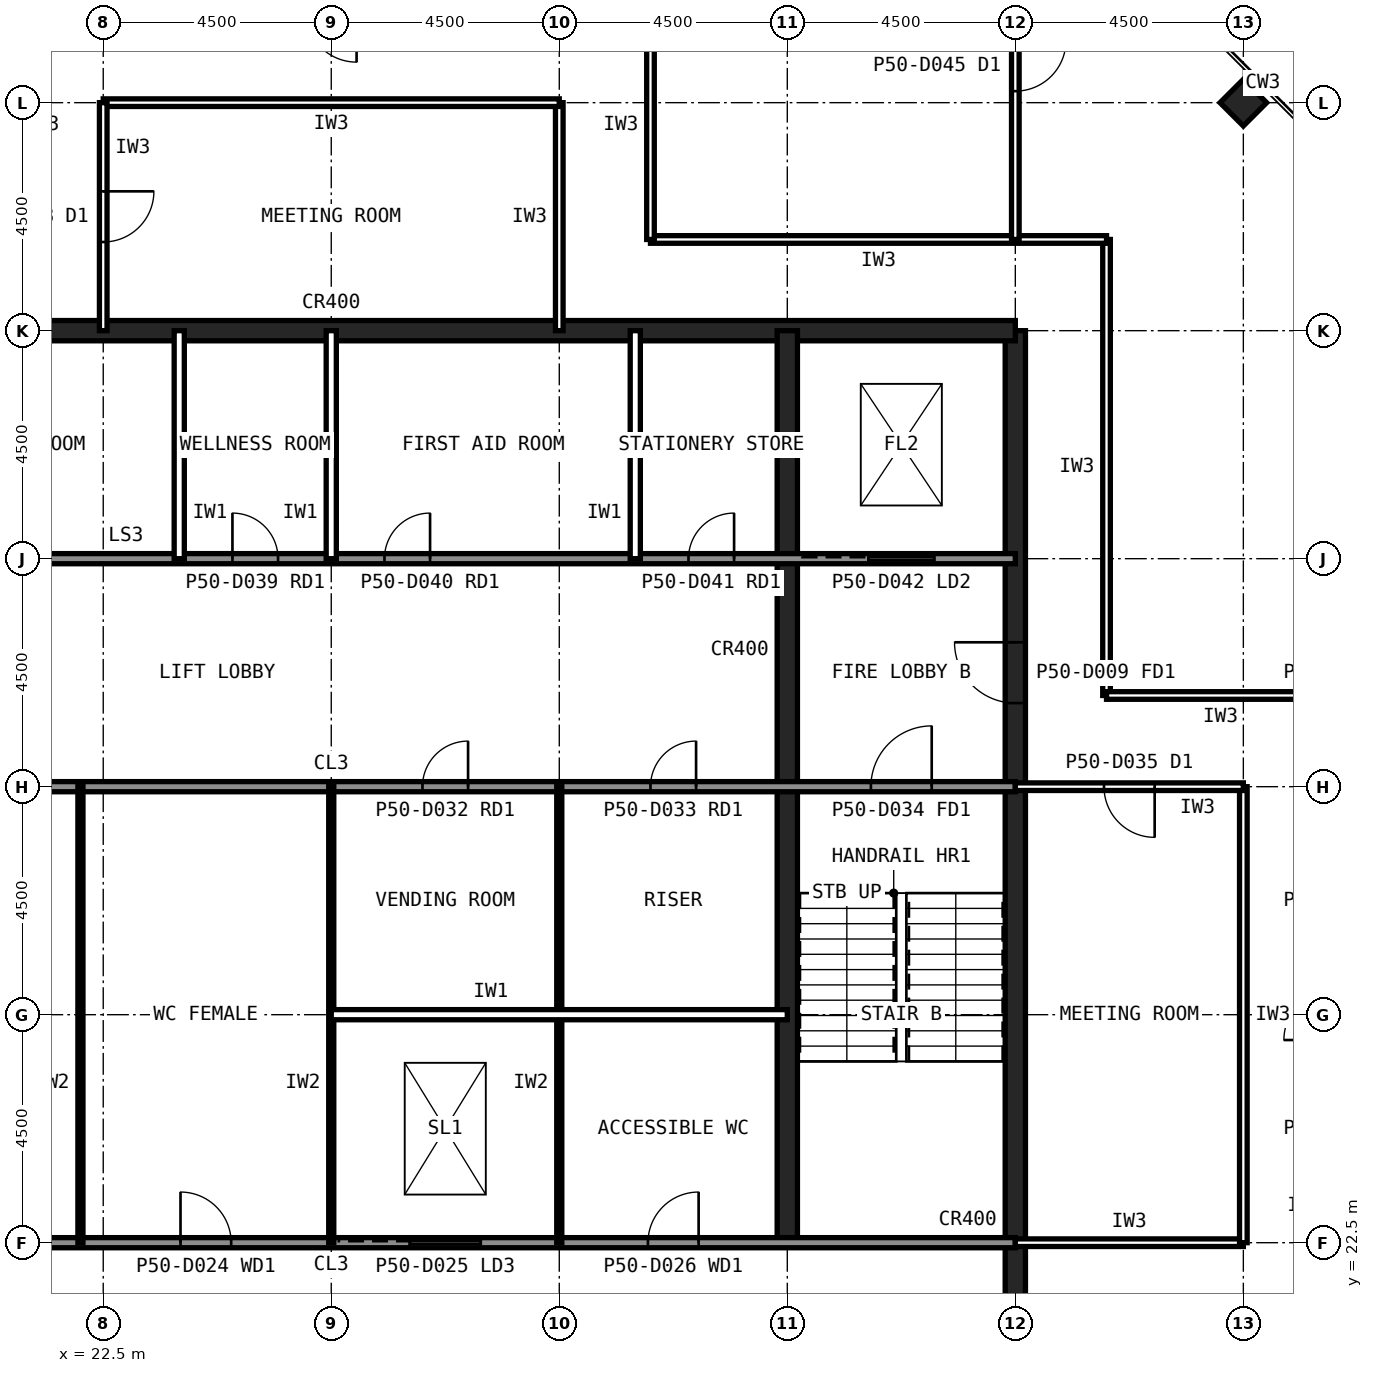
"""IFC4 building model, lengths in metres.
Left out: names, types, materials, properties, quantities, classifications, styles, units other than length and angle.
Written with IfcOpenShell. Run it as: python <this file> out.ifc"""

import sys

from ifc_helpers import new_model, si_unit, direction, frame, frame_2d, origin, origin_2d, place, context, subcontext, project, spatial, rectangle, hollow_rectangle, extrude, element, fill, save


model = new_model("IFC4")
c1 = context("Model", 3, precision=1e-05, world=origin(), true_north=direction((0.0, 1.0)))
c2 = subcontext(c1, "Body", "Model", "MODEL_VIEW")
j1 = project(units=[si_unit("LENGTHUNIT", "METRE"), si_unit("PLANEANGLEUNIT", "RADIAN")], contexts=[c1])
p1 = place(None, origin())
s1 = spatial("IfcSite", under=j1, at=p1, CompositionType="ELEMENT")
p2 = place(p1, origin())
s2 = spatial("IfcBuilding", under=s1, at=p2, CompositionType="ELEMENT")
p3 = place(p2, frame((0.0, 0.0, 214.6)))
s3 = spatial("IfcBuildingStorey", under=s2, at=p3, CompositionType="ELEMENT", Elevation=214.6)
p4 = place(p3, frame((45.0, 45.0, 0.0), z_axis=(0.0, 0.0, 1.0), x_axis=(0.707106781187, 0.707106781187, 0.0)))
e1 = element("IfcColumn", 1, at=p4, inside=s3, PredefinedType="COLUMN", context=c2, shape_type="SweptSolid", body=[
    extrude(hollow_rectangle(XDim=0.65, YDim=0.65, WallThickness=0.032, at=origin_2d()), origin(), (0.0, 0.0, 1.0), 4.0),
])
p5 = place(p3, frame((40.5, 13.5, 0.0), z_axis=(0.0, 0.0, 1.0), x_axis=(0.0, 1.0, 0.0)))
e2 = element("IfcWall", 2, at=p5, inside=s3, PredefinedType="SHEAR", context=c2, shape_type="SweptSolid", body=[
    extrude(rectangle(XDim=27.0, YDim=0.4, at=frame_2d((13.5, 0.0))), origin(), (0.0, 0.0, 1.0), 4.0),
])
p6 = place(p5, frame((5.85, 0.0, 0.0)))
e3 = element("IfcOpeningElement", 3, at=p6, cuts=e2, PredefinedType="OPENING", context=c2, shape_type="SweptSolid", body=[
    extrude(rectangle(XDim=1.8, YDim=2.1, at=frame_2d((0.9, 1.05))), frame((0.0, 0.21, 0.0), z_axis=(0.0, -1.0, 0.0), x_axis=(1.0, 0.0, 0.0)), (0.0, 0.0, 1.0), 0.42),
])
p7 = place(p5, frame((19.65, 0.0, 0.0)))
e4 = element("IfcOpeningElement", 4, at=p7, cuts=e2, PredefinedType="OPENING", context=c2, shape_type="SweptSolid", body=[
    extrude(rectangle(XDim=1.2, YDim=2.1, at=frame_2d((0.6, 1.05))), frame((0.0, 0.21, 0.0), z_axis=(0.0, -1.0, 0.0), x_axis=(1.0, 0.0, 0.0)), (0.0, 0.0, 1.0), 0.42),
])
p8 = place(p3, frame((40.5, 40.5, 0.0), z_axis=(0.0, 0.0, 1.0), x_axis=(-1.0, 0.0, 0.0)))
e5 = element("IfcWall", 5, at=p8, inside=s3, PredefinedType="SHEAR", context=c2, shape_type="SweptSolid", body=[
    extrude(rectangle(XDim=27.0, YDim=0.4, at=frame_2d((13.5, 0.0))), origin(), (0.0, 0.0, 1.0), 4.0),
])
p9 = place(p3, frame((36.0, 22.5, 0.0), z_axis=(0.0, 0.0, 1.0), x_axis=(0.0, 1.0, 0.0)))
e6 = element("IfcWall", 6, at=p9, inside=s3, PredefinedType="SHEAR", context=c2, shape_type="SweptSolid", body=[
    extrude(rectangle(XDim=18.0, YDim=0.4, at=frame_2d((9.0, 0.0))), origin(), (0.0, 0.0, 1.0), 4.0),
])
p10 = place(p3, frame((13.5, 36.0, 0.0), z_axis=(0.0, 0.0, 1.0), x_axis=(1.0, 0.0, 0.0)))
e7 = element("IfcWall", 7, at=p10, inside=s3, PredefinedType="SOLIDWALL", context=c2, shape_type="SweptSolid", body=[
    extrude(rectangle(XDim=27.0, YDim=0.2, at=frame_2d((13.5, 0.0))), origin(), (0.0, 0.0, 1.0), 3.84),
])
p11 = place(p10, frame((1.8, 0.0, 0.0)))
e8 = element("IfcOpeningElement", 8, at=p11, cuts=e7, PredefinedType="OPENING", context=c2, shape_type="SweptSolid", body=[
    extrude(rectangle(XDim=0.9, YDim=2.1, at=frame_2d((0.45, 1.05))), frame((0.0, 0.11, 0.0), z_axis=(0.0, -1.0, 0.0), x_axis=(1.0, 0.0, 0.0)), (0.0, 0.0, 1.0), 0.22),
])
p12 = place(p10, frame((5.55, 0.0, 0.0)))
e9 = element("IfcOpeningElement", 9, at=p12, cuts=e7, PredefinedType="OPENING", context=c2, shape_type="SweptSolid", body=[
    extrude(rectangle(XDim=0.9, YDim=2.1, at=frame_2d((0.45, 1.05))), frame((0.0, 0.11, 0.0), z_axis=(0.0, -1.0, 0.0), x_axis=(1.0, 0.0, 0.0)), (0.0, 0.0, 1.0), 0.22),
])
p13 = place(p10, frame((11.55, 0.0, 0.0)))
e10 = element("IfcOpeningElement", 10, at=p13, cuts=e7, PredefinedType="OPENING", context=c2, shape_type="SweptSolid", body=[
    extrude(rectangle(XDim=0.9, YDim=2.1, at=frame_2d((0.45, 1.05))), frame((0.0, 0.11, 0.0), z_axis=(0.0, -1.0, 0.0), x_axis=(1.0, 0.0, 0.0)), (0.0, 0.0, 1.0), 0.22),
])
p14 = place(p10, frame((14.55, 0.0, 0.0)))
e11 = element("IfcOpeningElement", 11, at=p14, cuts=e7, PredefinedType="OPENING", context=c2, shape_type="SweptSolid", body=[
    extrude(rectangle(XDim=0.9, YDim=2.1, at=frame_2d((0.45, 1.05))), frame((0.0, 0.11, 0.0), z_axis=(0.0, -1.0, 0.0), x_axis=(1.0, 0.0, 0.0)), (0.0, 0.0, 1.0), 0.22),
])
p15 = place(p10, frame((20.55, 0.0, 0.0)))
e12 = element("IfcOpeningElement", 12, at=p15, cuts=e7, PredefinedType="OPENING", context=c2, shape_type="SweptSolid", body=[
    extrude(rectangle(XDim=0.9, YDim=2.1, at=frame_2d((0.45, 1.05))), frame((0.0, 0.11, 0.0), z_axis=(0.0, -1.0, 0.0), x_axis=(1.0, 0.0, 0.0)), (0.0, 0.0, 1.0), 0.22),
])
p16 = place(p10, frame((24.1, 0.0, 0.0)))
e13 = element("IfcOpeningElement", 13, at=p16, cuts=e7, PredefinedType="OPENING", context=c2, shape_type="SweptSolid", body=[
    extrude(rectangle(XDim=1.3, YDim=2.2, at=frame_2d((0.65, 1.1))), frame((0.0, 0.11, 0.0), z_axis=(0.0, -1.0, 0.0), x_axis=(1.0, 0.0, 0.0)), (0.0, 0.0, 1.0), 0.22),
])
p17 = place(p3, frame((13.5, 22.5, 0.0), z_axis=(0.0, 0.0, 1.0), x_axis=(1.0, 0.0, 0.0)))
e14 = element("IfcWall", 14, at=p17, inside=s3, PredefinedType="SOLIDWALL", context=c2, shape_type="SweptSolid", body=[
    extrude(rectangle(XDim=27.0, YDim=0.2, at=frame_2d((13.5, 0.0))), origin(), (0.0, 0.0, 1.0), 3.84),
])
p18 = place(p17, frame((1.65, 0.0, 0.0)))
e15 = element("IfcOpeningElement", 15, at=p18, cuts=e14, PredefinedType="OPENING", context=c2, shape_type="SweptSolid", body=[
    extrude(rectangle(XDim=1.2, YDim=2.1, at=frame_2d((0.6, 1.05))), frame((0.0, 0.11, 0.0), z_axis=(0.0, -1.0, 0.0), x_axis=(1.0, 0.0, 0.0)), (0.0, 0.0, 1.0), 0.22),
])
p19 = place(p17, frame((6.025, 0.0, 0.0)))
e16 = element("IfcOpeningElement", 16, at=p19, cuts=e14, PredefinedType="OPENING", context=c2, shape_type="SweptSolid", body=[
    extrude(rectangle(XDim=1.0, YDim=2.1, at=frame_2d((0.5, 1.05))), frame((0.0, 0.11, 0.0), z_axis=(0.0, -1.0, 0.0), x_axis=(1.0, 0.0, 0.0)), (0.0, 0.0, 1.0), 0.22),
])
p20 = place(p17, frame((10.525, 0.0, 0.0)))
e17 = element("IfcOpeningElement", 17, at=p20, cuts=e14, PredefinedType="OPENING", context=c2, shape_type="SweptSolid", body=[
    extrude(rectangle(XDim=1.0, YDim=2.1, at=frame_2d((0.5, 1.05))), frame((0.0, 0.11, 0.0), z_axis=(0.0, -1.0, 0.0), x_axis=(1.0, 0.0, 0.0)), (0.0, 0.0, 1.0), 0.22),
])
p21 = place(p17, frame((19.75, 0.0, 0.0)))
e18 = element("IfcOpeningElement", 18, at=p21, cuts=e14, PredefinedType="OPENING", context=c2, shape_type="SweptSolid", body=[
    extrude(rectangle(XDim=1.0, YDim=2.1, at=frame_2d((0.5, 1.05))), frame((0.0, 0.11, 0.0), z_axis=(0.0, -1.0, 0.0), x_axis=(1.0, 0.0, 0.0)), (0.0, 0.0, 1.0), 0.22),
])
p22 = place(p17, frame((15.05, 0.0, 0.0)))
e19 = element("IfcOpeningElement", 19, at=p22, cuts=e14, PredefinedType="OPENING", context=c2, shape_type="SweptSolid", body=[
    extrude(rectangle(XDim=1.4, YDim=2.4, at=frame_2d((0.7, 1.2))), frame((0.0, 0.11, 0.0), z_axis=(0.0, -1.0, 0.0), x_axis=(1.0, 0.0, 0.0)), (0.0, 0.0, 1.0), 0.22),
])
p23 = place(p3, frame((13.5, 31.5, 0.0), z_axis=(0.0, 0.0, 1.0), x_axis=(1.0, 0.0, 0.0)))
e20 = element("IfcWall", 20, at=p23, inside=s3, PredefinedType="SOLIDWALL", context=c2, shape_type="SweptSolid", body=[
    extrude(rectangle(XDim=27.0, YDim=0.2, at=frame_2d((13.5, 0.0))), origin(), (0.0, 0.0, 1.0), 3.84),
])
p24 = place(p23, frame((24.15, 0.0, 0.0)))
e21 = element("IfcOpeningElement", 21, at=p24, cuts=e20, PredefinedType="OPENING", context=c2, shape_type="SweptSolid", body=[
    extrude(rectangle(XDim=1.2, YDim=2.1, at=frame_2d((0.6, 1.05))), frame((0.0, 0.11, 0.0), z_axis=(0.0, -1.0, 0.0), x_axis=(1.0, 0.0, 0.0)), (0.0, 0.0, 1.0), 0.22),
])
p25 = place(p23, frame((15.3, 0.0, 0.0)))
e22 = element("IfcOpeningElement", 22, at=p25, cuts=e20, PredefinedType="OPENING", context=c2, shape_type="SweptSolid", body=[
    extrude(rectangle(XDim=0.9, YDim=2.1, at=frame_2d((0.45, 1.05))), frame((0.0, 0.11, 0.0), z_axis=(0.0, -1.0, 0.0), x_axis=(1.0, 0.0, 0.0)), (0.0, 0.0, 1.0), 0.22),
])
p26 = place(p23, frame((19.8, 0.0, 0.0)))
e23 = element("IfcOpeningElement", 23, at=p26, cuts=e20, PredefinedType="OPENING", context=c2, shape_type="SweptSolid", body=[
    extrude(rectangle(XDim=0.9, YDim=2.1, at=frame_2d((0.45, 1.05))), frame((0.0, 0.11, 0.0), z_axis=(0.0, -1.0, 0.0), x_axis=(1.0, 0.0, 0.0)), (0.0, 0.0, 1.0), 0.22),
])
for number, where, z_axis, x_axis in (
    (24, (24.0, 36.0, 0.0), (0.0, 0.0, 1.0), (0.0, 1.0, 0.0)),
    (25, (27.0, 36.0, 0.0), (0.0, 0.0, 1.0), (0.0, 1.0, 0.0)),
    (26, (33.0, 36.0, 0.0), (0.0, 0.0, 1.0), (0.0, 1.0, 0.0)),
):
    element("IfcWall", number, at=place(p3, frame(where, z_axis=z_axis, x_axis=x_axis)), inside=s3, PredefinedType="PARTITIONING", context=c2, shape_type="SweptSolid", body=[
        extrude(rectangle(XDim=4.5, YDim=0.2, at=frame_2d((2.25, 0.0))), origin(), (0.0, 0.0, 1.0), 3.84),
    ])
for number, where, z_axis, x_axis in (
    (27, (22.05, 22.5, 0.0), (0.0, 0.0, 1.0), (0.0, 1.0, 0.0)),
    (28, (27.0, 22.5, 0.0), (0.0, 0.0, 1.0), (0.0, 1.0, 0.0)),
    (29, (31.5, 22.5, 0.0), (0.0, 0.0, 1.0), (0.0, 1.0, 0.0)),
):
    element("IfcWall", number, at=place(p3, frame(where, z_axis=z_axis, x_axis=x_axis)), inside=s3, PredefinedType="PLUMBINGWALL", context=c2, shape_type="SweptSolid", body=[
        extrude(rectangle(XDim=9.0, YDim=0.1, at=frame_2d((4.5, 0.0))), origin(), (0.0, 0.0, 1.0), 3.84),
    ])
p27 = place(p3, frame((27.0, 27.0, 0.0), z_axis=(0.0, 0.0, 1.0), x_axis=(1.0, 0.0, 0.0)))
e30 = element("IfcWall", 30, at=p27, inside=s3, PredefinedType="PARTITIONING", context=c2, shape_type="SweptSolid", body=[
    extrude(rectangle(XDim=9.0, YDim=0.2, at=frame_2d((4.5, 0.0))), origin(), (0.0, 0.0, 1.0), 3.84),
])
for number, where, z_axis, x_axis in (
    (31, (42.3, 33.3, 0.0), (0.0, 0.0, 1.0), (0.0, 1.0, 0.0)),
    (32, (42.3, 42.3, 0.0), (0.0, 0.0, 1.0), (-1.0, 0.0, 0.0)),
):
    element("IfcWall", number, at=place(p3, frame(where, z_axis=z_axis, x_axis=x_axis)), inside=s3, PredefinedType="PARTITIONING", context=c2, shape_type="SweptSolid", body=[
        extrude(rectangle(XDim=9.0, YDim=0.15, at=frame_2d((4.5, 0.0))), origin(), (0.0, 0.0, 1.0), 3.84),
    ])
for number, where, z_axis, x_axis in (
    (33, (33.3, 42.3, 0.0), (0.0, 0.0, 1.0), (0.0, 1.0, 0.0)),
    (34, (46.8, 33.3, 0.0), (0.0, 0.0, 1.0), (-1.0, 0.0, 0.0)),
):
    element("IfcWall", number, at=place(p3, frame(where, z_axis=z_axis, x_axis=x_axis)), inside=s3, PredefinedType="PARTITIONING", context=c2, shape_type="SweptSolid", body=[
        extrude(rectangle(XDim=4.5, YDim=0.15, at=frame_2d((2.25, 0.0))), origin(), (0.0, 0.0, 1.0), 3.84),
    ])
p28 = place(p3, frame((31.5, 40.5, 0.0), z_axis=(0.0, 0.0, 1.0), x_axis=(0.0, 1.0, 0.0)))
e35 = element("IfcWall", 35, at=p28, inside=s3, PredefinedType="PARTITIONING", context=c2, shape_type="SweptSolid", body=[
    extrude(rectangle(XDim=4.5, YDim=0.15, at=frame_2d((2.25, 0.0))), origin(), (0.0, 0.0, 1.0), 2.989),
])
p29 = place(p3, frame((31.5, 45.0, 0.0), z_axis=(0.0, 0.0, 1.0), x_axis=(-1.0, 0.0, 0.0)))
e36 = element("IfcWall", 36, at=p29, inside=s3, PredefinedType="PARTITIONING", context=c2, shape_type="SweptSolid", body=[
    extrude(rectangle(XDim=9.0, YDim=0.15, at=frame_2d((4.5, 0.0))), origin(), (0.0, 0.0, 1.0), 3.84),
])
p30 = place(p3, frame((22.5, 45.0, 0.0), z_axis=(0.0, 0.0, 1.0), x_axis=(0.0, -1.0, 0.0)))
e37 = element("IfcWall", 37, at=p30, inside=s3, PredefinedType="PARTITIONING", context=c2, shape_type="SweptSolid", body=[
    extrude(rectangle(XDim=4.5, YDim=0.15, at=frame_2d((2.25, 0.0))), origin(), (0.0, 0.0, 1.0), 2.989),
])
p31 = place(p30, frame((1.75, 0.0, 0.0)))
e38 = element("IfcOpeningElement", 38, at=p31, cuts=e37, PredefinedType="OPENING", context=c2, shape_type="SweptSolid", body=[
    extrude(rectangle(XDim=1.0, YDim=2.1, at=frame_2d((0.5, 1.05))), frame((0.0, 0.085, 0.0), z_axis=(0.0, -1.0, 0.0), x_axis=(1.0, 0.0, 0.0)), (0.0, 0.0, 1.0), 0.17),
])
p32 = place(p3, frame((40.5, 22.5, 0.0), z_axis=(0.0, 0.0, 1.0), x_axis=(1.0, 0.0, 0.0)))
e39 = element("IfcWall", 39, at=p32, inside=s3, PredefinedType="PARTITIONING", context=c2, shape_type="SweptSolid", body=[
    extrude(rectangle(XDim=4.5, YDim=0.15, at=frame_2d((2.25, 0.0))), origin(), (0.0, 0.0, 1.0), 2.989),
])
p33 = place(p3, frame((45.0, 22.5, 0.0), z_axis=(0.0, 0.0, 1.0), x_axis=(0.0, 1.0, 0.0)))
e40 = element("IfcWall", 40, at=p33, inside=s3, PredefinedType="PARTITIONING", context=c2, shape_type="SweptSolid", body=[
    extrude(rectangle(XDim=9.0, YDim=0.15, at=frame_2d((4.5, 0.0))), origin(), (0.0, 0.0, 1.0), 3.84),
])
p34 = place(p3, frame((45.0, 31.5, 0.0), z_axis=(0.0, 0.0, 1.0), x_axis=(-1.0, 0.0, 0.0)))
e41 = element("IfcWall", 41, at=p34, inside=s3, PredefinedType="PARTITIONING", context=c2, shape_type="SweptSolid", body=[
    extrude(rectangle(XDim=4.5, YDim=0.15, at=frame_2d((2.25, 0.0))), origin(), (0.0, 0.0, 1.0), 2.989),
])
p35 = place(p34, frame((1.75, 0.0, 0.0)))
e42 = element("IfcOpeningElement", 42, at=p35, cuts=e41, PredefinedType="OPENING", context=c2, shape_type="SweptSolid", body=[
    extrude(rectangle(XDim=1.0, YDim=2.1, at=frame_2d((0.5, 1.05))), frame((0.0, 0.085, 0.0), z_axis=(0.0, -1.0, 0.0), x_axis=(1.0, 0.0, 0.0)), (0.0, 0.0, 1.0), 0.17),
])
p36 = place(p3, frame((40.5, 49.155, 0.0), z_axis=(0.0, 0.0, 1.0), x_axis=(0.0, -1.0, 0.0)))
e43 = element("IfcWall", 43, at=p36, inside=s3, PredefinedType="PARTITIONING", context=c2, shape_type="SweptSolid", body=[
    extrude(rectangle(XDim=6.855, YDim=0.15, at=frame_2d((3.427, 0.0))), origin(), (0.0, 0.0, 1.0), 2.989),
])
p37 = place(p36, frame((2.927, 0.0, 0.0)))
e44 = element("IfcOpeningElement", 44, at=p37, cuts=e43, PredefinedType="OPENING", context=c2, shape_type="SweptSolid", body=[
    extrude(rectangle(XDim=1.0, YDim=2.1, at=frame_2d((0.5, 1.05))), frame((0.0, 0.085, 0.0), z_axis=(0.0, -1.0, 0.0), x_axis=(1.0, 0.0, 0.0)), (0.0, 0.0, 1.0), 0.17),
])
p38 = place(p7, origin())
e45 = element("IfcDoor", 45, at=p38, inside=s3, OperationType="SINGLE_SWING_RIGHT", PredefinedType="DOOR", context=c2, shape_type="SweptSolid", body=[
    extrude(rectangle(XDim=1.2, YDim=2.1, at=frame_2d((0.6, 1.05))), frame((0.0, 0.025, 0.0), z_axis=(0.0, -1.0, 0.0), x_axis=(1.0, 0.0, 0.0)), (0.0, 0.0, 1.0), 0.05),
])
fill(e4, e45)
p39 = place(p24, origin())
e46 = element("IfcDoor", 46, at=p39, inside=s3, OperationType="SINGLE_SWING_RIGHT", PredefinedType="DOOR", context=c2, shape_type="SweptSolid", body=[
    extrude(rectangle(XDim=1.2, YDim=2.1, at=frame_2d((0.6, 1.05))), frame((0.0, 0.025, 0.0), z_axis=(0.0, -1.0, 0.0), x_axis=(1.0, 0.0, 0.0)), (0.0, 0.0, 1.0), 0.05),
])
fill(e21, e46)
p40 = place(p20, origin())
e47 = element("IfcDoor", 47, at=p40, inside=s3, OperationType="SINGLE_SWING_LEFT", PredefinedType="DOOR", context=c2, shape_type="SweptSolid", body=[
    extrude(rectangle(XDim=1.0, YDim=2.1, at=frame_2d((0.5, 1.05))), frame((0.0, 0.025, 0.0), z_axis=(0.0, -1.0, 0.0), x_axis=(1.0, 0.0, 0.0)), (0.0, 0.0, 1.0), 0.05),
])
fill(e17, e47)
p41 = place(p21, origin())
e48 = element("IfcDoor", 48, at=p41, inside=s3, OperationType="SINGLE_SWING_RIGHT", PredefinedType="DOOR", context=c2, shape_type="SweptSolid", body=[
    extrude(rectangle(XDim=1.0, YDim=2.1, at=frame_2d((0.5, 1.05))), frame((0.0, 0.025, 0.0), z_axis=(0.0, -1.0, 0.0), x_axis=(1.0, 0.0, 0.0)), (0.0, 0.0, 1.0), 0.05),
])
fill(e18, e48)
p42 = place(p25, origin())
e49 = element("IfcDoor", 49, at=p42, inside=s3, OperationType="SINGLE_SWING_RIGHT", PredefinedType="DOOR", context=c2, shape_type="SweptSolid", body=[
    extrude(rectangle(XDim=0.9, YDim=2.1, at=frame_2d((0.45, 1.05))), frame((0.0, 0.025, 0.0), z_axis=(0.0, -1.0, 0.0), x_axis=(1.0, 0.0, 0.0)), (0.0, 0.0, 1.0), 0.05),
])
fill(e22, e49)
p43 = place(p26, origin())
e50 = element("IfcDoor", 50, at=p43, inside=s3, OperationType="SINGLE_SWING_RIGHT", PredefinedType="DOOR", context=c2, shape_type="SweptSolid", body=[
    extrude(rectangle(XDim=0.9, YDim=2.1, at=frame_2d((0.45, 1.05))), frame((0.0, 0.025, 0.0), z_axis=(0.0, -1.0, 0.0), x_axis=(1.0, 0.0, 0.0)), (0.0, 0.0, 1.0), 0.05),
])
fill(e23, e50)
p44 = place(p13, origin())
e51 = element("IfcDoor", 51, at=p44, inside=s3, OperationType="SINGLE_SWING_LEFT", PredefinedType="DOOR", context=c2, shape_type="SweptSolid", body=[
    extrude(rectangle(XDim=0.9, YDim=2.1, at=frame_2d((0.45, 1.05))), frame((0.0, 0.025, 0.0), z_axis=(0.0, -1.0, 0.0), x_axis=(1.0, 0.0, 0.0)), (0.0, 0.0, 1.0), 0.05),
])
fill(e10, e51)
p45 = place(p14, origin())
e52 = element("IfcDoor", 52, at=p45, inside=s3, OperationType="SINGLE_SWING_RIGHT", PredefinedType="DOOR", context=c2, shape_type="SweptSolid", body=[
    extrude(rectangle(XDim=0.9, YDim=2.1, at=frame_2d((0.45, 1.05))), frame((0.0, 0.025, 0.0), z_axis=(0.0, -1.0, 0.0), x_axis=(1.0, 0.0, 0.0)), (0.0, 0.0, 1.0), 0.05),
])
fill(e11, e52)
p46 = place(p15, origin())
e53 = element("IfcDoor", 53, at=p46, inside=s3, OperationType="SINGLE_SWING_RIGHT", PredefinedType="DOOR", context=c2, shape_type="SweptSolid", body=[
    extrude(rectangle(XDim=0.9, YDim=2.1, at=frame_2d((0.45, 1.05))), frame((0.0, 0.025, 0.0), z_axis=(0.0, -1.0, 0.0), x_axis=(1.0, 0.0, 0.0)), (0.0, 0.0, 1.0), 0.05),
])
fill(e12, e53)
p47 = place(p16, origin())
e54 = element("IfcDoor", 54, at=p47, inside=s3, OperationType="SLIDING_TO_LEFT", PredefinedType="DOOR", context=c2, shape_type="SweptSolid", body=[
    extrude(rectangle(XDim=1.3, YDim=2.2, at=frame_2d((0.65, 1.1))), frame((0.0, 0.025, 0.0), z_axis=(0.0, -1.0, 0.0), x_axis=(1.0, 0.0, 0.0)), (0.0, 0.0, 1.0), 0.05),
])
fill(e13, e54)
p48 = place(p22, origin())
e55 = element("IfcDoor", 55, at=p48, inside=s3, OperationType="SLIDING_TO_LEFT", PredefinedType="DOOR", context=c2, shape_type="SweptSolid", body=[
    extrude(rectangle(XDim=1.4, YDim=2.4, at=frame_2d((0.7, 1.2))), frame((0.0, 0.025, 0.0), z_axis=(0.0, -1.0, 0.0), x_axis=(1.0, 0.0, 0.0)), (0.0, 0.0, 1.0), 0.05),
])
fill(e19, e55)
p49 = place(p31, origin())
e56 = element("IfcDoor", 56, at=p49, inside=s3, OperationType="SINGLE_SWING_LEFT", PredefinedType="DOOR", context=c2, shape_type="SweptSolid", body=[
    extrude(rectangle(XDim=1.0, YDim=2.1, at=frame_2d((0.5, 1.05))), frame((0.0, 0.025, 0.0), z_axis=(0.0, -1.0, 0.0), x_axis=(1.0, 0.0, 0.0)), (0.0, 0.0, 1.0), 0.05),
])
fill(e38, e56)
p50 = place(p35, origin())
e57 = element("IfcDoor", 57, at=p50, inside=s3, OperationType="SINGLE_SWING_LEFT", PredefinedType="DOOR", context=c2, shape_type="SweptSolid", body=[
    extrude(rectangle(XDim=1.0, YDim=2.1, at=frame_2d((0.5, 1.05))), frame((0.0, 0.025, 0.0), z_axis=(0.0, -1.0, 0.0), x_axis=(1.0, 0.0, 0.0)), (0.0, 0.0, 1.0), 0.05),
])
fill(e42, e57)
p51 = place(p37, origin())
e58 = element("IfcDoor", 58, at=p51, inside=s3, OperationType="SINGLE_SWING_LEFT", PredefinedType="DOOR", context=c2, shape_type="SweptSolid", body=[
    extrude(rectangle(XDim=1.0, YDim=2.1, at=frame_2d((0.5, 1.05))), frame((0.0, 0.025, 0.0), z_axis=(0.0, -1.0, 0.0), x_axis=(1.0, 0.0, 0.0)), (0.0, 0.0, 1.0), 0.05),
])
fill(e44, e58)
save(model, sys.argv[1])
